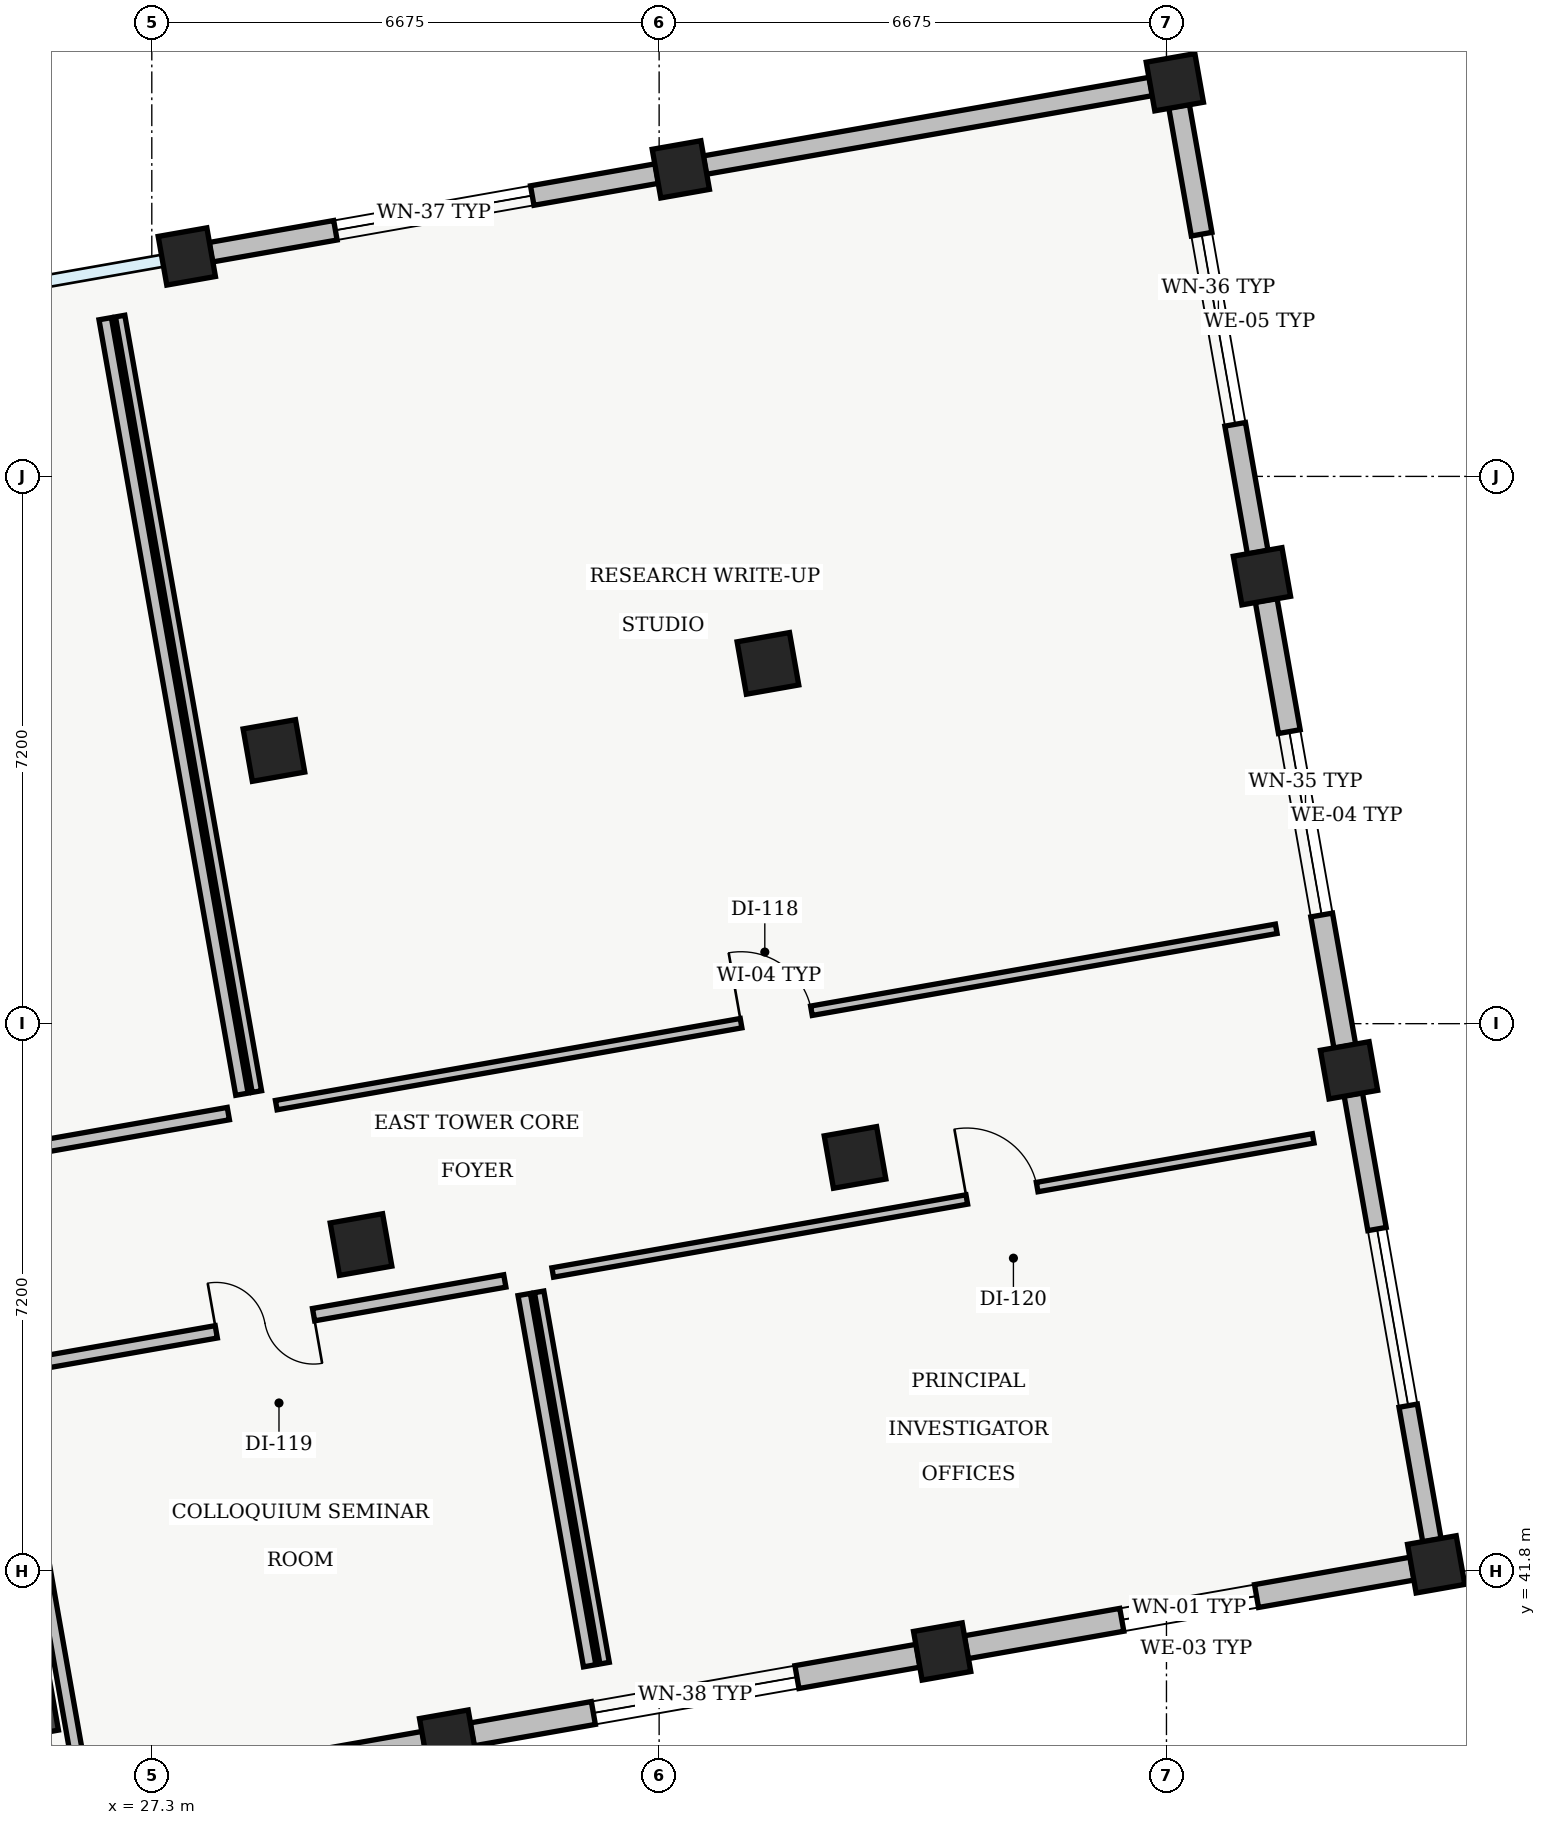
"""IFC4 building model, lengths in metres.
Left out: names, types, materials, properties, quantities, classifications, styles, units other than length and angle.
Written with IfcOpenShell. Run it as: python <this file> out.ifc"""

import sys

from ifc_helpers import new_model, si_unit, direction, frame, frame_2d, origin, origin_2d, place, context, subcontext, project, spatial, rectangle, extrude, element, fill, save


model = new_model("IFC4")
c1 = context("Model", 3, precision=1e-05, world=origin(), true_north=direction((0.0, 1.0)))
c2 = subcontext(c1, "Body", "Model", "MODEL_VIEW")
j1 = project(units=[si_unit("LENGTHUNIT", "METRE"), si_unit("PLANEANGLEUNIT", "RADIAN")], contexts=[c1])
p1 = place(None, origin())
s1 = spatial("IfcSite", under=j1, at=p1, CompositionType="ELEMENT")
p2 = place(p1, origin())
s2 = spatial("IfcBuilding", under=s1, at=p2, CompositionType="ELEMENT")
p3 = place(p2, frame((0.0, 0.0, 23.1)))
s3 = spatial("IfcBuildingStorey", under=s2, at=p3, CompositionType="ELEMENT", Elevation=23.1)
p4 = place(p3, frame((31.199, 39.594, 0.0), z_axis=(0.0, 0.0, 1.0), x_axis=(0.984807753012, 0.173648177667, 0.0)))
e1 = element("IfcColumn", 1, at=p4, inside=s3, PredefinedType="COLUMN", context=c2, shape_type="SweptSolid", body=[
    extrude(rectangle(XDim=0.65, YDim=0.65, at=origin_2d()), origin(), (0.0, 0.0, 1.0), 4.31),
])
for number, where, z_axis, x_axis in (
    (2, (30.053, 46.094, 0.0), (0.0, 0.0, 1.0), (0.985, 0.174, 0.0)),
    (3, (28.907, 52.594, 0.0), (0.0, 0.0, 1.0), (0.985, 0.174, 0.0)),
):
    element("IfcColumn", number, at=place(p3, frame(where, z_axis=z_axis, x_axis=x_axis)), inside=s3, PredefinedType="COLUMN", context=c2, shape_type="SweptSolid", body=[
        extrude(rectangle(XDim=0.7, YDim=0.7, at=origin_2d()), origin(), (0.0, 0.0, 1.0), 4.31),
    ])
for number, where, z_axis, x_axis in (
    (4, (27.761, 59.094, 0.0), (0.0, 0.0, 1.0), (0.985, 0.174, 0.0)),
    (5, (37.699, 40.74, 0.0), (0.0, 0.0, 1.0), (0.985, 0.174, 0.0)),
):
    element("IfcColumn", number, at=place(p3, frame(where, z_axis=z_axis, x_axis=x_axis)), inside=s3, PredefinedType="COLUMN", context=c2, shape_type="SweptSolid", body=[
        extrude(rectangle(XDim=0.65, YDim=0.65, at=origin_2d()), origin(), (0.0, 0.0, 1.0), 4.31),
    ])
for number, where, z_axis, x_axis in (
    (6, (36.552, 47.24, 0.0), (0.0, 0.0, 1.0), (0.985, 0.174, 0.0)),
    (7, (35.406, 53.74, 0.0), (0.0, 0.0, 1.0), (0.985, 0.174, 0.0)),
):
    element("IfcColumn", number, at=place(p3, frame(where, z_axis=z_axis, x_axis=x_axis)), inside=s3, PredefinedType="COLUMN", context=c2, shape_type="SweptSolid", body=[
        extrude(rectangle(XDim=0.7, YDim=0.7, at=origin_2d()), origin(), (0.0, 0.0, 1.0), 4.31),
    ])
for number, where, z_axis, x_axis in (
    (8, (34.26, 60.24, 0.0), (0.0, 0.0, 1.0), (0.985, 0.174, 0.0)),
    (9, (44.198, 41.886, 0.0), (0.0, 0.0, 1.0), (0.985, 0.174, 0.0)),
    (10, (43.052, 48.386, 0.0), (0.0, 0.0, 1.0), (0.985, 0.174, 0.0)),
    (11, (41.906, 54.886, 0.0), (0.0, 0.0, 1.0), (0.985, 0.174, 0.0)),
    (12, (40.76, 61.386, 0.0), (0.0, 0.0, 1.0), (0.985, 0.174, 0.0)),
):
    element("IfcColumn", number, at=place(p3, frame(where, z_axis=z_axis, x_axis=x_axis)), inside=s3, PredefinedType="COLUMN", context=c2, shape_type="SweptSolid", body=[
        extrude(rectangle(XDim=0.65, YDim=0.65, at=origin_2d()), origin(), (0.0, 0.0, 1.0), 4.31),
    ])
p5 = place(p3, frame((28.076, 59.149, 0.0), z_axis=(0.0, 0.0, 1.0), x_axis=(0.98480829201, 0.173645120828, 0.0)))
e13 = element("IfcWall", 13, at=p5, inside=s3, PredefinedType="STANDARD", context=c2, shape_type="SweptSolid", body=[
    extrude(rectangle(XDim=5.96, YDim=0.26, at=frame_2d((2.98, 0.0))), origin(), (0.0, 0.0, 1.0), 3.795),
])
p6 = place(p5, frame((1.665, 0.0, 0.95)))
e14 = element("IfcOpeningElement", 14, at=p6, cuts=e13, PredefinedType="OPENING", context=c2, shape_type="SweptSolid", body=[
    extrude(rectangle(XDim=2.63, YDim=1.42, at=frame_2d((1.315, 0.71))), frame((0.0, 0.13, 0.0), z_axis=(0.0, -1.0, 0.0), x_axis=(1.0, 0.0, 0.0)), (0.0, 0.0, 1.0), 0.26),
])
p7 = place(p3, frame((34.575, 60.295, 0.0), z_axis=(0.0, 0.0, 1.0), x_axis=(0.984809527099, 0.173638116021, 0.0)))
e15 = element("IfcWall", 15, at=p7, inside=s3, PredefinedType="STANDARD", context=c2, shape_type="SweptSolid", body=[
    extrude(rectangle(XDim=5.96, YDim=0.245, at=frame_2d((2.98, 0.0))), origin(), (0.0, 0.0, 1.0), 3.795),
])
p8 = place(p3, frame((40.816, 61.071, 0.0), z_axis=(0.0, 0.0, 1.0), x_axis=(0.173645120828, -0.98480829201, 0.0)))
e16 = element("IfcWall", 16, at=p8, inside=s3, PredefinedType="STANDARD", context=c2, shape_type="SweptSolid", body=[
    extrude(rectangle(XDim=5.96, YDim=0.275, at=frame_2d((2.98, 0.0))), origin(), (0.0, 0.0, 1.0), 3.795),
])
p9 = place(p8, frame((1.71, 0.0, 0.95)))
e17 = element("IfcOpeningElement", 17, at=p9, cuts=e16, PredefinedType="OPENING", context=c2, shape_type="SweptSolid", body=[
    extrude(rectangle(XDim=2.54, YDim=1.4, at=frame_2d((1.27, 0.7))), frame((0.0, 0.137, 0.0), z_axis=(0.0, -1.0, 0.0), x_axis=(1.0, 0.0, 0.0)), (0.0, 0.0, 1.0), 0.275),
])
p10 = place(p3, frame((41.962, 54.571, 0.0), z_axis=(0.0, 0.0, 1.0), x_axis=(0.173645120828, -0.98480829201, 0.0)))
e18 = element("IfcWall", 18, at=p10, inside=s3, PredefinedType="STANDARD", context=c2, shape_type="SweptSolid", body=[
    extrude(rectangle(XDim=5.96, YDim=0.29, at=frame_2d((2.98, 0.0))), origin(), (0.0, 0.0, 1.0), 3.795),
])
p11 = place(p10, frame((1.755, 0.0, 0.95)))
e19 = element("IfcOpeningElement", 19, at=p11, cuts=e18, PredefinedType="OPENING", context=c2, shape_type="SweptSolid", body=[
    extrude(rectangle(XDim=2.45, YDim=1.38, at=frame_2d((1.225, 0.69))), frame((0.0, 0.145, 0.0), z_axis=(0.0, -1.0, 0.0), x_axis=(1.0, 0.0, 0.0)), (0.0, 0.0, 1.0), 0.29),
])
p12 = place(p3, frame((43.108, 48.071, 0.0), z_axis=(0.0, 0.0, 1.0), x_axis=(0.173645120828, -0.98480829201, 0.0)))
e20 = element("IfcWall", 20, at=p12, inside=s3, PredefinedType="STANDARD", context=c2, shape_type="SweptSolid", body=[
    extrude(rectangle(XDim=5.96, YDim=0.245, at=frame_2d((2.98, 0.0))), origin(), (0.0, 0.0, 1.0), 3.795),
])
p13 = place(p12, frame((1.8, 0.0, 0.95)))
e21 = element("IfcOpeningElement", 21, at=p13, cuts=e20, PredefinedType="OPENING", context=c2, shape_type="SweptSolid", body=[
    extrude(rectangle(XDim=2.36, YDim=1.36, at=frame_2d((1.18, 0.68))), frame((0.0, 0.123, 0.0), z_axis=(0.0, -1.0, 0.0), x_axis=(1.0, 0.0, 0.0)), (0.0, 0.0, 1.0), 0.245),
])
p14 = place(p3, frame((43.883, 41.831, 0.0), z_axis=(0.0, 0.0, 1.0), x_axis=(-0.98480829201, -0.173645120828, 0.0)))
e22 = element("IfcWall", 22, at=p14, inside=s3, PredefinedType="STANDARD", context=c2, shape_type="SweptSolid", body=[
    extrude(rectangle(XDim=5.96, YDim=0.305, at=frame_2d((2.98, 0.0))), origin(), (0.0, 0.0, 1.0), 3.795),
])
p15 = place(p14, frame((2.08, 0.0, 0.95)))
e23 = element("IfcOpeningElement", 23, at=p15, cuts=e22, PredefinedType="OPENING", context=c2, shape_type="SweptSolid", body=[
    extrude(rectangle(XDim=1.8, YDim=1.65, at=frame_2d((0.9, 0.825))), frame((0.0, 0.152, 0.0), z_axis=(0.0, -1.0, 0.0), x_axis=(1.0, 0.0, 0.0)), (0.0, 0.0, 1.0), 0.305),
])
p16 = place(p3, frame((37.384, 40.685, 0.0), z_axis=(0.0, 0.0, 1.0), x_axis=(-0.98480829201, -0.173645120828, 0.0)))
e24 = element("IfcWall", 24, at=p16, inside=s3, PredefinedType="STANDARD", context=c2, shape_type="SweptSolid", body=[
    extrude(rectangle(XDim=5.96, YDim=0.305, at=frame_2d((2.98, 0.0))), origin(), (0.0, 0.0, 1.0), 3.795),
])
p17 = place(p16, frame((1.62, 0.0, 0.95)))
e25 = element("IfcOpeningElement", 25, at=p17, cuts=e24, PredefinedType="OPENING", context=c2, shape_type="SweptSolid", body=[
    extrude(rectangle(XDim=2.72, YDim=1.44, at=frame_2d((1.36, 0.72))), frame((0.0, 0.152, 0.0), z_axis=(0.0, -1.0, 0.0), x_axis=(1.0, 0.0, 0.0)), (0.0, 0.0, 1.0), 0.305),
])
p18 = place(p3, frame((30.884, 39.539, 0.0), z_axis=(0.0, 0.0, 1.0), x_axis=(-0.98480829201, -0.173645120828, 0.0)))
e26 = element("IfcWall", 26, at=p18, inside=s3, PredefinedType="STANDARD", context=c2, shape_type="SweptSolid", body=[
    extrude(rectangle(XDim=5.96, YDim=0.305, at=frame_2d((2.98, 0.0))), origin(), (0.0, 0.0, 1.0), 3.795),
])
p19 = place(p18, frame((1.665, 0.0, 0.95)))
e27 = element("IfcOpeningElement", 27, at=p19, cuts=e26, PredefinedType="OPENING", context=c2, shape_type="SweptSolid", body=[
    extrude(rectangle(XDim=2.63, YDim=1.42, at=frame_2d((1.315, 0.71))), frame((0.0, 0.152, 0.0), z_axis=(0.0, -1.0, 0.0), x_axis=(1.0, 0.0, 0.0)), (0.0, 0.0, 1.0), 0.305),
])
p20 = place(p3, frame((25.219, 43.678, 0.0), z_axis=(0.0, 0.0, 1.0), x_axis=(0.173665267602, -0.984804739443, 0.0)))
e28 = element("IfcWall", 28, at=p20, inside=s3, PredefinedType="SHEAR", context=c2, shape_type="SweptSolid", body=[
    extrude(rectangle(XDim=4.06, YDim=0.3, at=frame_2d((2.03, 0.0))), origin(), (0.0, 0.0, 1.0), 4.28),
])
p21 = place(p3, frame((20.665, 46.469, 0.0), z_axis=(0.0, 0.0, 1.0), x_axis=(0.984804455571, 0.173666877348, 0.0)))
e29 = element("IfcWall", 29, at=p21, inside=s3, PredefinedType="PARTITIONING", context=c2, shape_type="SweptSolid", body=[
    extrude(rectangle(XDim=7.76, YDim=0.165, at=frame_2d((3.88, 0.0))), origin(), (0.0, 0.0, 1.0), 3.845),
])
p22 = place(p21, frame((3.125, 0.0, 0.0)))
e30 = element("IfcOpeningElement", 30, at=p22, cuts=e29, PredefinedType="OPENING", context=c2, shape_type="SweptSolid", body=[
    extrude(rectangle(XDim=1.51, YDim=2.12, at=frame_2d((0.755, 1.06))), frame((0.0, 0.083, 0.0), z_axis=(0.0, -1.0, 0.0), x_axis=(1.0, 0.0, 0.0)), (0.0, 0.0, 1.0), 0.165),
])
p23 = place(p3, frame((28.486, 48.072, 0.0), z_axis=(0.0, 0.0, 1.0), x_axis=(-0.173654930775, 0.984806562233, 0.0)))
e31 = element("IfcWall", 31, at=p23, inside=s3, PredefinedType="PARTITIONING", context=c2, shape_type="SweptSolid", body=[
    extrude(rectangle(XDim=10.36, YDim=0.165, at=frame_2d((5.18, 0.0))), origin(), (0.0, 0.0, 1.0), 3.95),
])
p24 = place(p3, frame((28.938, 47.928, 0.0), z_axis=(0.0, 0.0, 1.0), x_axis=(0.984809119622, 0.173640427059, 0.0)))
e32 = element("IfcWall", 32, at=p24, inside=s3, PredefinedType="PARTITIONING", context=c2, shape_type="SweptSolid", body=[
    extrude(rectangle(XDim=13.36, YDim=0.125, at=frame_2d((6.68, 0.0))), origin(), (0.0, 0.0, 1.0), 3.845),
])
p25 = place(p24, frame((6.21, 0.0, 0.0)))
e33 = element("IfcOpeningElement", 33, at=p25, cuts=e32, PredefinedType="OPENING", context=c2, shape_type="SweptSolid", body=[
    extrude(rectangle(XDim=0.94, YDim=2.12, at=frame_2d((0.47, 1.06))), frame((0.0, 0.062, 0.0), z_axis=(0.0, -1.0, 0.0), x_axis=(1.0, 0.0, 0.0)), (0.0, 0.0, 1.0), 0.125),
])
p26 = place(p3, frame((26.884, 58.309, 0.0), z_axis=(0.0, 0.0, 1.0), x_axis=(0.173654930775, -0.984806562233, 0.0)))
e34 = element("IfcWall", 34, at=p26, inside=s3, PredefinedType="PARTITIONING", context=c2, shape_type="SweptSolid", body=[
    extrude(rectangle(XDim=10.36, YDim=0.125, at=frame_2d((5.18, 0.0))), origin(), (0.0, 0.0, 1.0), 3.95),
])
p27 = place(p3, frame((33.061, 40.552, 0.0), z_axis=(0.0, 0.0, 1.0), x_axis=(-0.173658971256, 0.98480584975, 0.0)))
e35 = element("IfcWall", 35, at=p27, inside=s3, PredefinedType="PARTITIONING", context=c2, shape_type="SweptSolid", body=[
    extrude(rectangle(XDim=4.96, YDim=0.165, at=frame_2d((2.48, 0.0))), origin(), (0.0, 0.0, 1.0), 3.95),
])
p28 = place(p3, frame((31.945, 45.615, 0.0), z_axis=(0.0, 0.0, 1.0), x_axis=(-0.984809620557, -0.173637585958, 0.0)))
e36 = element("IfcWall", 36, at=p28, inside=s3, PredefinedType="PARTITIONING", context=c2, shape_type="SweptSolid", body=[
    extrude(rectangle(XDim=6.41, YDim=0.165, at=frame_2d((3.205, 0.0))), origin(), (0.0, 0.0, 1.0), 3.95),
])
p29 = place(p28, frame((2.555, 0.0, 0.0)))
e37 = element("IfcOpeningElement", 37, at=p29, cuts=e36, PredefinedType="OPENING", context=c2, shape_type="SweptSolid", body=[
    extrude(rectangle(XDim=1.3, YDim=2.18, at=frame_2d((0.65, 1.09))), frame((0.0, 0.083, 0.0), z_axis=(0.0, -1.0, 0.0), x_axis=(1.0, 0.0, 0.0)), (0.0, 0.0, 1.0), 0.165),
])
p30 = place(p3, frame((25.454, 44.247, 0.0), z_axis=(0.0, 0.0, 1.0), x_axis=(0.173658971256, -0.98480584975, 0.0)))
e38 = element("IfcWall", 38, at=p30, inside=s3, PredefinedType="PARTITIONING", context=c2, shape_type="SweptSolid", body=[
    extrude(rectangle(XDim=4.96, YDim=0.165, at=frame_2d((2.48, 0.0))), origin(), (0.0, 0.0, 1.0), 3.95),
])
p31 = place(p3, frame((42.581, 47.491, 0.0), z_axis=(0.0, 0.0, 1.0), x_axis=(-0.98480532288, -0.173661959067, 0.0)))
e39 = element("IfcWall", 39, at=p31, inside=s3, PredefinedType="PARTITIONING", context=c2, shape_type="SweptSolid", body=[
    extrude(rectangle(XDim=10.16, YDim=0.125, at=frame_2d((5.08, 0.0))), origin(), (0.0, 0.0, 1.0), 3.95),
])
p32 = place(p31, frame((3.688, 0.0, 0.0)))
e40 = element("IfcOpeningElement", 40, at=p32, cuts=e39, PredefinedType="OPENING", context=c2, shape_type="SweptSolid", body=[
    extrude(rectangle(XDim=0.94, YDim=2.12, at=frame_2d((0.47, 1.06))), frame((0.0, 0.062, 0.0), z_axis=(0.0, -1.0, 0.0), x_axis=(1.0, 0.0, 0.0)), (0.0, 0.0, 1.0), 0.125),
])
p33 = place(p3, frame((32.396, 45.472, 0.0), z_axis=(0.0, 0.0, 1.0), x_axis=(0.173650553511, -0.984807334084, 0.0)))
e41 = element("IfcWall", 41, at=p33, inside=s3, PredefinedType="PARTITIONING", context=c2, shape_type="SweptSolid", body=[
    extrude(rectangle(XDim=4.96, YDim=0.125, at=frame_2d((2.48, 0.0))), origin(), (0.0, 0.0, 1.0), 3.95),
])
p34 = place(p6, origin())
e42 = element("IfcWindow", 42, at=p34, inside=s3, PartitioningType="SINGLE_PANEL", PredefinedType="WINDOW", context=c2, shape_type="SweptSolid", body=[
    extrude(rectangle(XDim=2.63, YDim=1.42, at=frame_2d((1.315, 0.71))), frame((0.0, 0.03, 0.0), z_axis=(0.0, -1.0, 0.0), x_axis=(1.0, 0.0, 0.0)), (0.0, 0.0, 1.0), 0.06),
])
fill(e14, e42)
p35 = place(p9, origin())
e43 = element("IfcWindow", 43, at=p35, inside=s3, PartitioningType="SINGLE_PANEL", PredefinedType="WINDOW", context=c2, shape_type="SweptSolid", body=[
    extrude(rectangle(XDim=2.54, YDim=1.4, at=frame_2d((1.27, 0.7))), frame((0.0, 0.03, 0.0), z_axis=(0.0, -1.0, 0.0), x_axis=(1.0, 0.0, 0.0)), (0.0, 0.0, 1.0), 0.06),
])
fill(e17, e43)
p36 = place(p11, origin())
e44 = element("IfcWindow", 44, at=p36, inside=s3, PartitioningType="SINGLE_PANEL", PredefinedType="WINDOW", context=c2, shape_type="SweptSolid", body=[
    extrude(rectangle(XDim=2.45, YDim=1.38, at=frame_2d((1.225, 0.69))), frame((0.0, 0.03, 0.0), z_axis=(0.0, -1.0, 0.0), x_axis=(1.0, 0.0, 0.0)), (0.0, 0.0, 1.0), 0.06),
])
fill(e19, e44)
p37 = place(p13, origin())
e45 = element("IfcWindow", 45, at=p37, inside=s3, PartitioningType="SINGLE_PANEL", PredefinedType="WINDOW", context=c2, shape_type="SweptSolid", body=[
    extrude(rectangle(XDim=2.36, YDim=1.36, at=frame_2d((1.18, 0.68))), frame((0.0, 0.03, 0.0), z_axis=(0.0, -1.0, 0.0), x_axis=(1.0, 0.0, 0.0)), (0.0, 0.0, 1.0), 0.06),
])
fill(e21, e45)
p38 = place(p15, origin())
e46 = element("IfcWindow", 46, at=p38, inside=s3, PartitioningType="SINGLE_PANEL", PredefinedType="WINDOW", context=c2, shape_type="SweptSolid", body=[
    extrude(rectangle(XDim=1.8, YDim=1.65, at=frame_2d((0.9, 0.825))), frame((0.0, 0.03, 0.0), z_axis=(0.0, -1.0, 0.0), x_axis=(1.0, 0.0, 0.0)), (0.0, 0.0, 1.0), 0.06),
])
fill(e23, e46)
p39 = place(p17, origin())
e47 = element("IfcWindow", 47, at=p39, inside=s3, PartitioningType="SINGLE_PANEL", PredefinedType="WINDOW", context=c2, shape_type="SweptSolid", body=[
    extrude(rectangle(XDim=2.72, YDim=1.44, at=frame_2d((1.36, 0.72))), frame((0.0, 0.03, 0.0), z_axis=(0.0, -1.0, 0.0), x_axis=(1.0, 0.0, 0.0)), (0.0, 0.0, 1.0), 0.06),
])
fill(e25, e47)
p40 = place(p25, origin())
e48 = element("IfcDoor", 48, at=p40, inside=s3, OperationType="SINGLE_SWING_LEFT", PredefinedType="DOOR", context=c2, shape_type="SweptSolid", body=[
    extrude(rectangle(XDim=0.94, YDim=2.12, at=frame_2d((0.47, 1.06))), frame((0.0, 0.025, 0.0), z_axis=(0.0, -1.0, 0.0), x_axis=(1.0, 0.0, 0.0)), (0.0, 0.0, 1.0), 0.05),
])
fill(e33, e48)
p41 = place(p29, origin())
e49 = element("IfcDoor", 49, at=p41, inside=s3, OperationType="DOUBLE_DOOR_SINGLE_SWING", PredefinedType="DOOR", context=c2, shape_type="SweptSolid", body=[
    extrude(rectangle(XDim=1.3, YDim=2.18, at=frame_2d((0.65, 1.09))), frame((0.0, 0.025, 0.0), z_axis=(0.0, -1.0, 0.0), x_axis=(1.0, 0.0, 0.0)), (0.0, 0.0, 1.0), 0.05),
])
fill(e37, e49)
p42 = place(p32, origin())
e50 = element("IfcDoor", 50, at=p42, inside=s3, OperationType="SINGLE_SWING_RIGHT", PredefinedType="DOOR", context=c2, shape_type="SweptSolid", body=[
    extrude(rectangle(XDim=0.94, YDim=2.12, at=frame_2d((0.47, 1.06))), frame((0.0, 0.025, 0.0), z_axis=(0.0, -1.0, 0.0), x_axis=(1.0, 0.0, 0.0)), (0.0, 0.0, 1.0), 0.05),
])
fill(e40, e50)
save(model, sys.argv[1])
